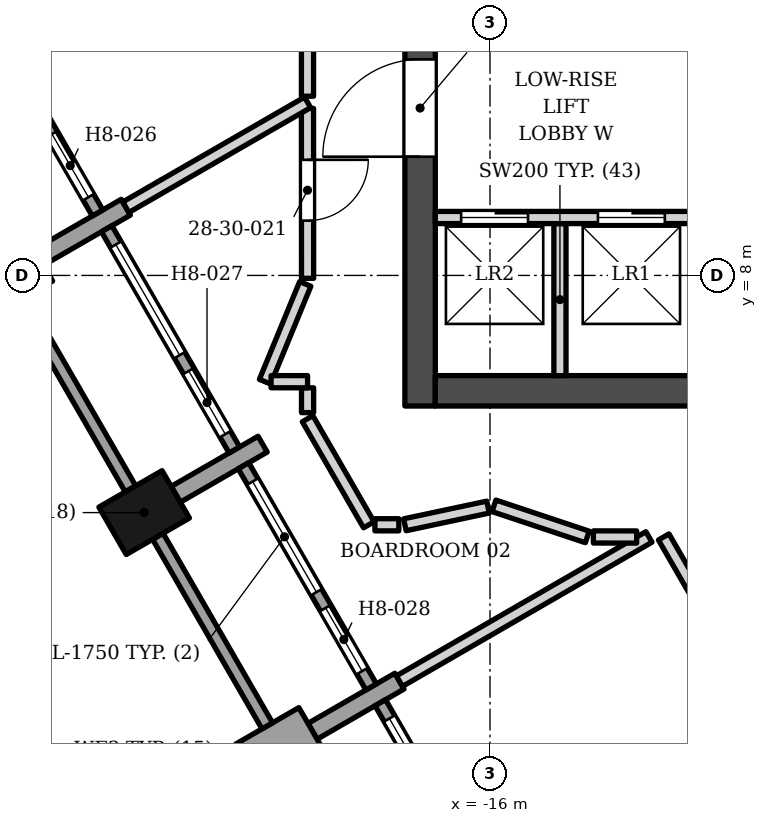
"""IFC4 building model, lengths in metres.
Left out: names, types, materials, properties, quantities, classifications, styles, units other than length and angle.
Written with IfcOpenShell. Run it as: python <this file> out.ifc"""

import sys

from ifc_helpers import new_model, si_unit, direction, frame, frame_2d, origin, origin_2d, place, context, subcontext, project, spatial, rectangle, extrude, element, fill, save


model = new_model("IFC4")
c1 = context("Model", 3, precision=1e-05, world=origin(), true_north=direction((0.0, 1.0)))
c2 = subcontext(c1, "Body", "Model", "MODEL_VIEW")
j1 = project(units=[si_unit("LENGTHUNIT", "METRE"), si_unit("PLANEANGLEUNIT", "RADIAN")], contexts=[c1])
p1 = place(None, origin())
s1 = spatial("IfcSite", under=j1, at=p1, CompositionType="ELEMENT")
p2 = place(p1, origin())
s2 = spatial("IfcBuilding", under=s1, at=p2, CompositionType="ELEMENT")
p3 = place(p2, frame((0.0, 0.0, 122.4)))
s3 = spatial("IfcBuildingStorey", under=s2, at=p3, CompositionType="ELEMENT", Elevation=122.4)
p4 = place(p3, frame((-12.6, 6.103, 0.0), z_axis=(0.0, 0.0, 1.0), x_axis=(-1.0, 0.0, 0.0)))
e1 = element("IfcWall", 1, at=p4, inside=s3, PredefinedType="SHEAR", context=c2, shape_type="SweptSolid", body=[
    extrude(rectangle(XDim=4.3, YDim=0.5, at=frame_2d((2.15, 0.0))), origin(), (0.0, 0.0, 1.0), 3.4),
])
p5 = place(p3, frame((-17.15, 5.853, 0.0), z_axis=(0.0, 0.0, 1.0), x_axis=(0.0, 1.0, 0.0)))
e2 = element("IfcWall", 2, at=p5, inside=s3, PredefinedType="SHEAR", context=c2, shape_type="SweptSolid", body=[
    extrude(rectangle(XDim=13.2, YDim=0.5, at=frame_2d((6.6, 0.0))), origin(), (0.0, 0.0, 1.0), 3.4),
])
p6 = place(p5, frame((4.1, 0.0, 0.0)))
e3 = element("IfcOpeningElement", 3, at=p6, cuts=e2, PredefinedType="OPENING", context=c2, shape_type="SweptSolid", body=[
    extrude(rectangle(XDim=1.6, YDim=2.1, at=frame_2d((0.8, 1.05))), frame((0.0, 0.26, 0.0), z_axis=(0.0, -1.0, 0.0), x_axis=(1.0, 0.0, 0.0)), (0.0, 0.0, 1.0), 0.52),
])
p7 = place(p5, frame((9.75, 0.0, 0.0)))
e4 = element("IfcOpeningElement", 4, at=p7, cuts=e2, PredefinedType="OPENING", context=c2, shape_type="SweptSolid", body=[
    extrude(rectangle(XDim=0.9, YDim=2.1, at=frame_2d((0.45, 1.05))), frame((0.0, 0.26, 0.0), z_axis=(0.0, -1.0, 0.0), x_axis=(1.0, 0.0, 0.0)), (0.0, 0.0, 1.0), 0.52),
])
p8 = place(p3, frame((-21.688, 4.1, 0.0), z_axis=(0.0, 0.0, 1.0), x_axis=(0.5, -0.866025403784, 0.0)))
e5 = element("IfcColumn", 5, at=p8, inside=s3, PredefinedType="COLUMN", context=c2, shape_type="SweptSolid", body=[
    extrude(rectangle(XDim=0.9, YDim=1.2, at=origin_2d()), origin(), (0.0, 0.0, 1.0), 3.4),
])
p9 = place(p3, frame((-24.458, 7.697, 0.0), z_axis=(0.0, 0.0, 1.0), x_axis=(0.865955154139, 0.50012165622, 0.0)))
e6 = element("IfcWall", 6, at=p9, inside=s3, PredefinedType="SOLIDWALL", context=c2, shape_type="SweptSolid", body=[
    extrude(rectangle(XDim=1.2, YDim=0.9, at=frame_2d((0.6, 0.0))), origin(), (0.0, 0.0, 1.0), 2.63),
])
p10 = place(p3, frame((-23.419, 8.297, 0.0), z_axis=(0.0, 0.0, 1.0), x_axis=(0.866040211805, 0.499974350878, 0.0)))
e7 = element("IfcWall", 7, at=p10, inside=s3, PredefinedType="SOLIDWALL", context=c2, shape_type="SweptSolid", body=[
    extrude(rectangle(XDim=1.65, YDim=0.3, at=frame_2d((0.825, 0.0))), origin(), (0.0, 0.0, 1.0), 2.65),
])
p11 = place(p3, frame((-21.168, 4.4, 0.0), z_axis=(0.0, 0.0, 1.0), x_axis=(0.866003217194, 0.500038426333, 0.0)))
e8 = element("IfcWall", 8, at=p11, inside=s3, PredefinedType="SOLIDWALL", context=c2, shape_type="SweptSolid", body=[
    extrude(rectangle(XDim=1.65, YDim=0.3, at=frame_2d((0.825, 0.0))), origin(), (0.0, 0.0, 1.0), 2.45),
])
p12 = place(p3, frame((-19.958, -0.097, 0.0), z_axis=(0.0, 0.0, 1.0), x_axis=(0.865955154139, 0.50012165622, 0.0)))
e9 = element("IfcWall", 9, at=p12, inside=s3, PredefinedType="SOLIDWALL", context=c2, shape_type="SweptSolid", body=[
    extrude(rectangle(XDim=1.2, YDim=0.9, at=frame_2d((0.6, 0.0))), origin(), (0.0, 0.0, 1.0), 2.63),
])
p13 = place(p3, frame((-18.919, 0.503, 0.0), z_axis=(0.0, 0.0, 1.0), x_axis=(0.866040211805, 0.499974350878, 0.0)))
e10 = element("IfcWall", 10, at=p13, inside=s3, PredefinedType="SOLIDWALL", context=c2, shape_type="SweptSolid", body=[
    extrude(rectangle(XDim=1.65, YDim=0.3, at=frame_2d((0.825, 0.0))), origin(), (0.0, 0.0, 1.0), 2.65),
])
p14 = place(p3, frame((-24.554, 12.665, 0.0), z_axis=(0.0, 0.0, 1.0), x_axis=(0.500002543286, -0.866023935413, 0.0)))
e11 = element("IfcWall", 11, at=p14, inside=s3, PredefinedType="ELEMENTEDWALL", context=c2, shape_type="SweptSolid", body=[
    extrude(rectangle(XDim=4.2, YDim=0.2, at=frame_2d((2.1, 0.0))), origin(), (0.0, 0.0, 1.0), 2.65),
])
p15 = place(p14, frame((0.3, 0.0, 0.6)))
e12 = element("IfcOpeningElement", 12, at=p15, cuts=e11, PredefinedType="OPENING", context=c2, shape_type="SweptSolid", body=[
    extrude(rectangle(XDim=2.1, YDim=1.8, at=frame_2d((1.05, 0.9))), frame((0.0, 0.11, 0.0), z_axis=(0.0, -1.0, 0.0), x_axis=(1.0, 0.0, 0.0)), (0.0, 0.0, 1.0), 0.22),
])
p16 = place(p14, frame((2.7, 0.0, 0.0)))
e13 = element("IfcOpeningElement", 13, at=p16, cuts=e11, PredefinedType="OPENING", context=c2, shape_type="SweptSolid", body=[
    extrude(rectangle(XDim=1.2, YDim=2.4, at=frame_2d((0.6, 1.2))), frame((0.0, 0.11, 0.0), z_axis=(0.0, -1.0, 0.0), x_axis=(1.0, 0.0, 0.0)), (0.0, 0.0, 1.0), 0.22),
])
p17 = place(p3, frame((-23.713, 7.608, 0.0), z_axis=(0.0, 0.0, 1.0), x_axis=(0.500012057535, -0.866018442252, 0.0)))
e14 = element("IfcWall", 14, at=p17, inside=s3, PredefinedType="SOLIDWALL", context=c2, shape_type="SweptSolid", body=[
    extrude(rectangle(XDim=3.6, YDim=0.2, at=frame_2d((1.8, 0.0))), origin(), (0.0, 0.0, 1.0), 2.63),
])
p18 = place(p3, frame((-22.304, 8.767, 0.0), z_axis=(0.0, 0.0, 1.0), x_axis=(0.500027713859, -0.866009402589, 0.0)))
e15 = element("IfcWall", 15, at=p18, inside=s3, PredefinedType="ELEMENTEDWALL", context=c2, shape_type="SweptSolid", body=[
    extrude(rectangle(XDim=4.2, YDim=0.2, at=frame_2d((2.1, 0.0))), origin(), (0.0, 0.0, 1.0), 2.65),
])
p19 = place(p18, frame((0.3, 0.0, 0.6)))
e16 = element("IfcOpeningElement", 16, at=p19, cuts=e15, PredefinedType="OPENING", context=c2, shape_type="SweptSolid", body=[
    extrude(rectangle(XDim=2.1, YDim=1.8, at=frame_2d((1.05, 0.9))), frame((0.0, 0.11, 0.0), z_axis=(0.0, -1.0, 0.0), x_axis=(1.0, 0.0, 0.0)), (0.0, 0.0, 1.0), 0.22),
])
p20 = place(p18, frame((2.7, 0.0, 0.0)))
e17 = element("IfcOpeningElement", 17, at=p20, cuts=e15, PredefinedType="OPENING", context=c2, shape_type="SweptSolid", body=[
    extrude(rectangle(XDim=1.2, YDim=2.4, at=frame_2d((0.6, 1.2))), frame((0.0, 0.11, 0.0), z_axis=(0.0, -1.0, 0.0), x_axis=(1.0, 0.0, 0.0)), (0.0, 0.0, 1.0), 0.22),
])
p21 = place(p3, frame((-21.463, 3.71, 0.0), z_axis=(0.0, 0.0, 1.0), x_axis=(0.500012057535, -0.866018442252, 0.0)))
e18 = element("IfcWall", 18, at=p21, inside=s3, PredefinedType="SOLIDWALL", context=c2, shape_type="SweptSolid", body=[
    extrude(rectangle(XDim=3.6, YDim=0.2, at=frame_2d((1.8, 0.0))), origin(), (0.0, 0.0, 1.0), 2.63),
])
p22 = place(p3, frame((-20.054, 4.87, 0.0), z_axis=(0.0, 0.0, 1.0), x_axis=(0.500002543286, -0.866023935413, 0.0)))
e19 = element("IfcWall", 19, at=p22, inside=s3, PredefinedType="ELEMENTEDWALL", context=c2, shape_type="SweptSolid", body=[
    extrude(rectangle(XDim=4.2, YDim=0.2, at=frame_2d((2.1, 0.0))), origin(), (0.0, 0.0, 1.0), 2.45),
])
p23 = place(p22, frame((0.3, 0.0, 0.6)))
e20 = element("IfcOpeningElement", 20, at=p23, cuts=e19, PredefinedType="OPENING", context=c2, shape_type="SweptSolid", body=[
    extrude(rectangle(XDim=2.1, YDim=1.75, at=frame_2d((1.05, 0.875))), frame((0.0, 0.11, 0.0), z_axis=(0.0, -1.0, 0.0), x_axis=(1.0, 0.0, 0.0)), (0.0, 0.0, 1.0), 0.22),
])
p24 = place(p22, frame((2.7, 0.0, 0.0)))
e21 = element("IfcOpeningElement", 21, at=p24, cuts=e19, PredefinedType="OPENING", context=c2, shape_type="SweptSolid", body=[
    extrude(rectangle(XDim=1.2, YDim=2.35, at=frame_2d((0.6, 1.175))), frame((0.0, 0.11, 0.0), z_axis=(0.0, -1.0, 0.0), x_axis=(1.0, 0.0, 0.0)), (0.0, 0.0, 1.0), 0.22),
])
p25 = place(p3, frame((-17.804, 0.973, 0.0), z_axis=(0.0, 0.0, 1.0), x_axis=(0.500027713859, -0.866009402589, 0.0)))
e22 = element("IfcWall", 22, at=p25, inside=s3, PredefinedType="ELEMENTEDWALL", context=c2, shape_type="SweptSolid", body=[
    extrude(rectangle(XDim=4.2, YDim=0.2, at=frame_2d((2.1, 0.0))), origin(), (0.0, 0.0, 1.0), 2.628),
])
p26 = place(p25, frame((0.3, 0.0, 0.6)))
e23 = element("IfcOpeningElement", 23, at=p26, cuts=e22, PredefinedType="OPENING", context=c2, shape_type="SweptSolid", body=[
    extrude(rectangle(XDim=2.1, YDim=1.8, at=frame_2d((1.05, 0.9))), frame((0.0, 0.11, 0.0), z_axis=(0.0, -1.0, 0.0), x_axis=(1.0, 0.0, 0.0)), (0.0, 0.0, 1.0), 0.22),
])
p27 = place(p25, frame((2.7, 0.0, 0.0)))
e24 = element("IfcOpeningElement", 24, at=p27, cuts=e22, PredefinedType="OPENING", context=c2, shape_type="SweptSolid", body=[
    extrude(rectangle(XDim=1.2, YDim=2.4, at=frame_2d((0.6, 1.2))), frame((0.0, 0.11, 0.0), z_axis=(0.0, -1.0, 0.0), x_axis=(1.0, 0.0, 0.0)), (0.0, 0.0, 1.0), 0.22),
])
p28 = place(p3, frame((-14.85, 6.353, 0.0), z_axis=(0.0, 0.0, 1.0), x_axis=(0.0, 1.0, 0.0)))
e25 = element("IfcWall", 25, at=p28, inside=s3, PredefinedType="SOLIDWALL", context=c2, shape_type="SweptSolid", body=[
    extrude(rectangle(XDim=2.5, YDim=0.2, at=frame_2d((1.25, 0.0))), origin(), (0.0, 0.0, 1.0), 3.23),
])
p29 = place(p3, frame((-16.9, 8.953, 0.0), z_axis=(0.0, 0.0, 1.0), x_axis=(1.0, 0.0, 0.0)))
e26 = element("IfcWall", 26, at=p29, inside=s3, PredefinedType="SOLIDWALL", context=c2, shape_type="SweptSolid", body=[
    extrude(rectangle(XDim=4.3, YDim=0.2, at=frame_2d((2.15, 0.0))), origin(), (0.0, 0.0, 1.0), 3.23),
])
p30 = place(p29, frame((2.675, 0.0, 0.0)))
e27 = element("IfcOpeningElement", 27, at=p30, cuts=e26, PredefinedType="OPENING", context=c2, shape_type="SweptSolid", body=[
    extrude(rectangle(XDim=1.1, YDim=2.1, at=frame_2d((0.55, 1.05))), frame((0.0, 0.11, 0.0), z_axis=(0.0, -1.0, 0.0), x_axis=(1.0, 0.0, 0.0)), (0.0, 0.0, 1.0), 0.22),
])
p31 = place(p29, frame((0.425, 0.0, 0.0)))
e28 = element("IfcOpeningElement", 28, at=p31, cuts=e26, PredefinedType="OPENING", context=c2, shape_type="SweptSolid", body=[
    extrude(rectangle(XDim=1.1, YDim=2.1, at=frame_2d((0.55, 1.05))), frame((0.0, 0.11, 0.0), z_axis=(0.0, -1.0, 0.0), x_axis=(1.0, 0.0, 0.0)), (0.0, 0.0, 1.0), 0.22),
])
p32 = place(p3, frame((-13.143, 3.7, 0.0), z_axis=(0.0, 0.0, 1.0), x_axis=(0.499816656841, -0.866131231133, 0.0)))
e29 = element("IfcWall", 29, at=p32, inside=s3, PredefinedType="PARTITIONING", context=c2, shape_type="SweptSolid", body=[
    extrude(rectangle(XDim=15.48, YDim=0.2, at=frame_2d((7.74, 0.0))), origin(), (0.0, 0.0, 1.0), 2.242),
])
p33 = place(p32, frame((3.64, 0.0, 0.0)))
e30 = element("IfcOpeningElement", 30, at=p33, cuts=e29, PredefinedType="OPENING", context=c2, shape_type="SweptSolid", body=[
    extrude(rectangle(XDim=1.6, YDim=2.1, at=frame_2d((0.8, 1.05))), frame((0.0, 0.11, 0.0), z_axis=(0.0, -1.0, 0.0), x_axis=(1.0, 0.0, 0.0)), (0.0, 0.0, 1.0), 0.22),
])
p34 = place(p32, frame((9.381, 0.0, 0.0)))
e31 = element("IfcOpeningElement", 31, at=p34, cuts=e29, PredefinedType="OPENING", context=c2, shape_type="SweptSolid", body=[
    extrude(rectangle(XDim=1.1, YDim=2.1, at=frame_2d((0.55, 1.05))), frame((0.0, 0.11, 0.0), z_axis=(0.0, -1.0, 0.0), x_axis=(1.0, 0.0, 0.0)), (0.0, 0.0, 1.0), 0.22),
])
p35 = place(p3, frame((-17.49, 1.329, 0.0), z_axis=(0.0, 0.0, 1.0), x_axis=(0.865884411482, 0.500244126355, 0.0)))
e32 = element("IfcWall", 32, at=p35, inside=s3, PredefinedType="PARTITIONING", context=c2, shape_type="SweptSolid", body=[
    extrude(rectangle(XDim=4.74, YDim=0.2, at=frame_2d((2.37, 0.0))), origin(), (0.0, 0.0, 1.0), 2.384),
])
p36 = place(p3, frame((-15.935, 4.211, 0.0), z_axis=(0.0, 0.0, 1.0), x_axis=(0.948653110684, -0.316318313712, 0.0)))
e33 = element("IfcWall", 33, at=p36, inside=s3, PredefinedType="PARTITIONING", context=c2, shape_type="SweptSolid", body=[
    extrude(rectangle(XDim=1.618, YDim=0.2, at=frame_2d((0.809, 0.0))), origin(), (0.0, 0.0, 1.0), 2.628),
])
p37 = place(p3, frame((-14.3, 3.699, 0.0), z_axis=(0.0, 0.0, 1.0), x_axis=(0.999998529944, -0.00171467512, 0.0)))
e34 = element("IfcWall", 34, at=p37, inside=s3, PredefinedType="PARTITIONING", context=c2, shape_type="SweptSolid", body=[
    extrude(rectangle(XDim=0.712, YDim=0.2, at=frame_2d((0.356, 0.0))), origin(), (0.0, 0.0, 1.0), 3.23),
])
p38 = place(p3, frame((-19.0, 5.644, 0.0), z_axis=(0.0, 0.0, 1.0), x_axis=(0.500075657258, -0.86598171864, 0.0)))
e35 = element("IfcWall", 35, at=p38, inside=s3, PredefinedType="PARTITIONING", context=c2, shape_type="SweptSolid", body=[
    extrude(rectangle(XDim=2.014, YDim=0.2, at=frame_2d((1.007, 0.0))), origin(), (0.0, 0.0, 1.0), 2.45),
])
p39 = place(p3, frame((-17.893, 3.899, 0.0), z_axis=(0.0, 0.0, 1.0), x_axis=(1.0, 0.0, 0.0)))
e36 = element("IfcWall", 36, at=p39, inside=s3, PredefinedType="PARTITIONING", context=c2, shape_type="SweptSolid", body=[
    extrude(rectangle(XDim=0.393, YDim=0.2, at=frame_2d((0.197, 0.0))), origin(), (0.0, 0.0, 1.0), 3.23),
])
p40 = place(p3, frame((-17.4, 3.899, 0.0), z_axis=(0.0, 0.0, 1.0), x_axis=(0.978123323974, 0.208025871224, 0.0)))
e37 = element("IfcWall", 37, at=p40, inside=s3, PredefinedType="PARTITIONING", context=c2, shape_type="SweptSolid", body=[
    extrude(rectangle(XDim=1.398, YDim=0.2, at=frame_2d((0.699, 0.0))), origin(), (0.0, 0.0, 1.0), 3.23),
])
p41 = place(p3, frame((-19.0, 6.152, 0.0), z_axis=(0.0, 0.0, 1.0), x_axis=(0.0, -1.0, 0.0)))
e38 = element("IfcWall", 38, at=p41, inside=s3, PredefinedType="PARTITIONING", context=c2, shape_type="SweptSolid", body=[
    extrude(rectangle(XDim=0.408, YDim=0.2, at=frame_2d((0.204, 0.0))), origin(), (0.0, 0.0, 1.0), 3.23),
])
p42 = place(p3, frame((-19.7, 6.253, 0.0), z_axis=(0.0, 0.0, 1.0), x_axis=(0.380742741509, 0.924681007044, 0.0)))
e39 = element("IfcWall", 39, at=p42, inside=s3, PredefinedType="PARTITIONING", context=c2, shape_type="SweptSolid", body=[
    extrude(rectangle(XDim=1.738, YDim=0.2, at=frame_2d((0.869, 0.0))), origin(), (0.0, 0.0, 1.0), 3.23),
])
p43 = place(p3, frame((-19.601, 6.253, 0.0), z_axis=(0.0, 0.0, 1.0), x_axis=(0.999999668971, -0.000813669381, 0.0)))
e40 = element("IfcWall", 40, at=p43, inside=s3, PredefinedType="PARTITIONING", context=c2, shape_type="SweptSolid", body=[
    extrude(rectangle(XDim=0.6, YDim=0.2, at=frame_2d((0.3, 0.0))), origin(), (0.0, 0.0, 1.0), 3.23),
])
p44 = place(p3, frame((-19.002, 10.747, 0.0), z_axis=(0.0, 0.0, 1.0), x_axis=(0.000524200522, -0.999999862607, 0.0)))
e41 = element("IfcWall", 41, at=p44, inside=s3, PredefinedType="PARTITIONING", context=c2, shape_type="SweptSolid", body=[
    extrude(rectangle(XDim=2.794, YDim=0.2, at=frame_2d((1.397, 0.0))), origin(), (0.0, 0.0, 1.0), 3.23),
])
p45 = place(p44, frame((0.846, 0.0, 0.0)))
e42 = element("IfcOpeningElement", 42, at=p45, cuts=e41, PredefinedType="OPENING", context=c2, shape_type="SweptSolid", body=[
    extrude(rectangle(XDim=1.0, YDim=2.1, at=frame_2d((0.5, 1.05))), frame((0.0, 0.11, 0.0), z_axis=(0.0, -1.0, 0.0), x_axis=(1.0, 0.0, 0.0)), (0.0, 0.0, 1.0), 0.22),
])
p46 = place(p3, frame((-21.99, 9.122, 0.0), z_axis=(0.0, 0.0, 1.0), x_axis=(0.866285697387, 0.499548887001, 0.0)))
e43 = element("IfcWall", 43, at=p46, inside=s3, PredefinedType="PARTITIONING", context=c2, shape_type="SweptSolid", body=[
    extrude(rectangle(XDim=3.45, YDim=0.2, at=frame_2d((1.725, 0.0))), origin(), (0.0, 0.0, 1.0), 3.23),
])
p47 = place(p3, frame((-19.002, 10.947, 0.0), z_axis=(0.0, 0.0, 1.0), x_axis=(0.000609075108, 0.999999814514, 0.0)))
e44 = element("IfcWall", 44, at=p47, inside=s3, PredefinedType="PARTITIONING", context=c2, shape_type="SweptSolid", body=[
    extrude(rectangle(XDim=2.405, YDim=0.2, at=frame_2d((1.203, 0.0))), origin(), (0.0, 0.0, 1.0), 3.23),
])
p48 = place(p16, origin())
e45 = element("IfcDoor", 45, at=p48, inside=s3, OperationType="SINGLE_SWING_LEFT", PredefinedType="DOOR", context=c2, shape_type="SweptSolid", body=[
    extrude(rectangle(XDim=1.2, YDim=2.4, at=frame_2d((0.6, 1.2))), frame((0.0, 0.025, 0.0), z_axis=(0.0, -1.0, 0.0), x_axis=(1.0, 0.0, 0.0)), (0.0, 0.0, 1.0), 0.05),
])
fill(e13, e45)
p49 = place(p19, origin())
e46 = element("IfcWindow", 46, at=p49, inside=s3, PartitioningType="SINGLE_PANEL", PredefinedType="WINDOW", context=c2, shape_type="SweptSolid", body=[
    extrude(rectangle(XDim=2.1, YDim=1.8, at=frame_2d((1.05, 0.9))), frame((0.0, 0.03, 0.0), z_axis=(0.0, -1.0, 0.0), x_axis=(1.0, 0.0, 0.0)), (0.0, 0.0, 1.0), 0.06),
])
fill(e16, e46)
p50 = place(p20, origin())
e47 = element("IfcDoor", 47, at=p50, inside=s3, OperationType="SINGLE_SWING_LEFT", PredefinedType="DOOR", context=c2, shape_type="SweptSolid", body=[
    extrude(rectangle(XDim=1.2, YDim=2.4, at=frame_2d((0.6, 1.2))), frame((0.0, 0.025, 0.0), z_axis=(0.0, -1.0, 0.0), x_axis=(1.0, 0.0, 0.0)), (0.0, 0.0, 1.0), 0.05),
])
fill(e17, e47)
p51 = place(p23, origin())
e48 = element("IfcWindow", 48, at=p51, inside=s3, PartitioningType="SINGLE_PANEL", PredefinedType="WINDOW", context=c2, shape_type="SweptSolid", body=[
    extrude(rectangle(XDim=2.1, YDim=1.75, at=frame_2d((1.05, 0.875))), frame((0.0, 0.03, 0.0), z_axis=(0.0, -1.0, 0.0), x_axis=(1.0, 0.0, 0.0)), (0.0, 0.0, 1.0), 0.06),
])
fill(e20, e48)
p52 = place(p24, origin())
e49 = element("IfcDoor", 49, at=p52, inside=s3, OperationType="SINGLE_SWING_LEFT", PredefinedType="DOOR", context=c2, shape_type="SweptSolid", body=[
    extrude(rectangle(XDim=1.2, YDim=2.35, at=frame_2d((0.6, 1.175))), frame((0.0, 0.025, 0.0), z_axis=(0.0, -1.0, 0.0), x_axis=(1.0, 0.0, 0.0)), (0.0, 0.0, 1.0), 0.05),
])
fill(e21, e49)
p53 = place(p26, origin())
e50 = element("IfcWindow", 50, at=p53, inside=s3, PartitioningType="SINGLE_PANEL", PredefinedType="WINDOW", context=c2, shape_type="SweptSolid", body=[
    extrude(rectangle(XDim=2.1, YDim=1.8, at=frame_2d((1.05, 0.9))), frame((0.0, 0.03, 0.0), z_axis=(0.0, -1.0, 0.0), x_axis=(1.0, 0.0, 0.0)), (0.0, 0.0, 1.0), 0.06),
])
fill(e23, e50)
p54 = place(p30, origin())
e51 = element("IfcDoor", 51, at=p54, inside=s3, OperationType="DOUBLE_DOOR_SLIDING", PredefinedType="DOOR", context=c2, shape_type="SweptSolid", body=[
    extrude(rectangle(XDim=1.1, YDim=2.1, at=frame_2d((0.55, 1.05))), frame((0.0, 0.025, 0.0), z_axis=(0.0, -1.0, 0.0), x_axis=(1.0, 0.0, 0.0)), (0.0, 0.0, 1.0), 0.05),
])
fill(e27, e51)
p55 = place(p31, origin())
e52 = element("IfcDoor", 52, at=p55, inside=s3, OperationType="DOUBLE_DOOR_SLIDING", PredefinedType="DOOR", context=c2, shape_type="SweptSolid", body=[
    extrude(rectangle(XDim=1.1, YDim=2.1, at=frame_2d((0.55, 1.05))), frame((0.0, 0.025, 0.0), z_axis=(0.0, -1.0, 0.0), x_axis=(1.0, 0.0, 0.0)), (0.0, 0.0, 1.0), 0.05),
])
fill(e28, e52)
p56 = place(p6, origin())
e53 = element("IfcDoor", 53, at=p56, inside=s3, OperationType="DOUBLE_DOOR_SINGLE_SWING", PredefinedType="DOOR", context=c2, shape_type="SweptSolid", body=[
    extrude(rectangle(XDim=1.6, YDim=2.1, at=frame_2d((0.8, 1.05))), frame((0.0, 0.025, 0.0), z_axis=(0.0, -1.0, 0.0), x_axis=(1.0, 0.0, 0.0)), (0.0, 0.0, 1.0), 0.05),
])
fill(e3, e53)
p57 = place(p45, origin())
e54 = element("IfcDoor", 54, at=p57, inside=s3, OperationType="SINGLE_SWING_LEFT", PredefinedType="DOOR", context=c2, shape_type="SweptSolid", body=[
    extrude(rectangle(XDim=1.0, YDim=2.1, at=frame_2d((0.5, 1.05))), frame((0.0, 0.025, 0.0), z_axis=(0.0, -1.0, 0.0), x_axis=(1.0, 0.0, 0.0)), (0.0, 0.0, 1.0), 0.05),
])
fill(e42, e54)
save(model, sys.argv[1])
